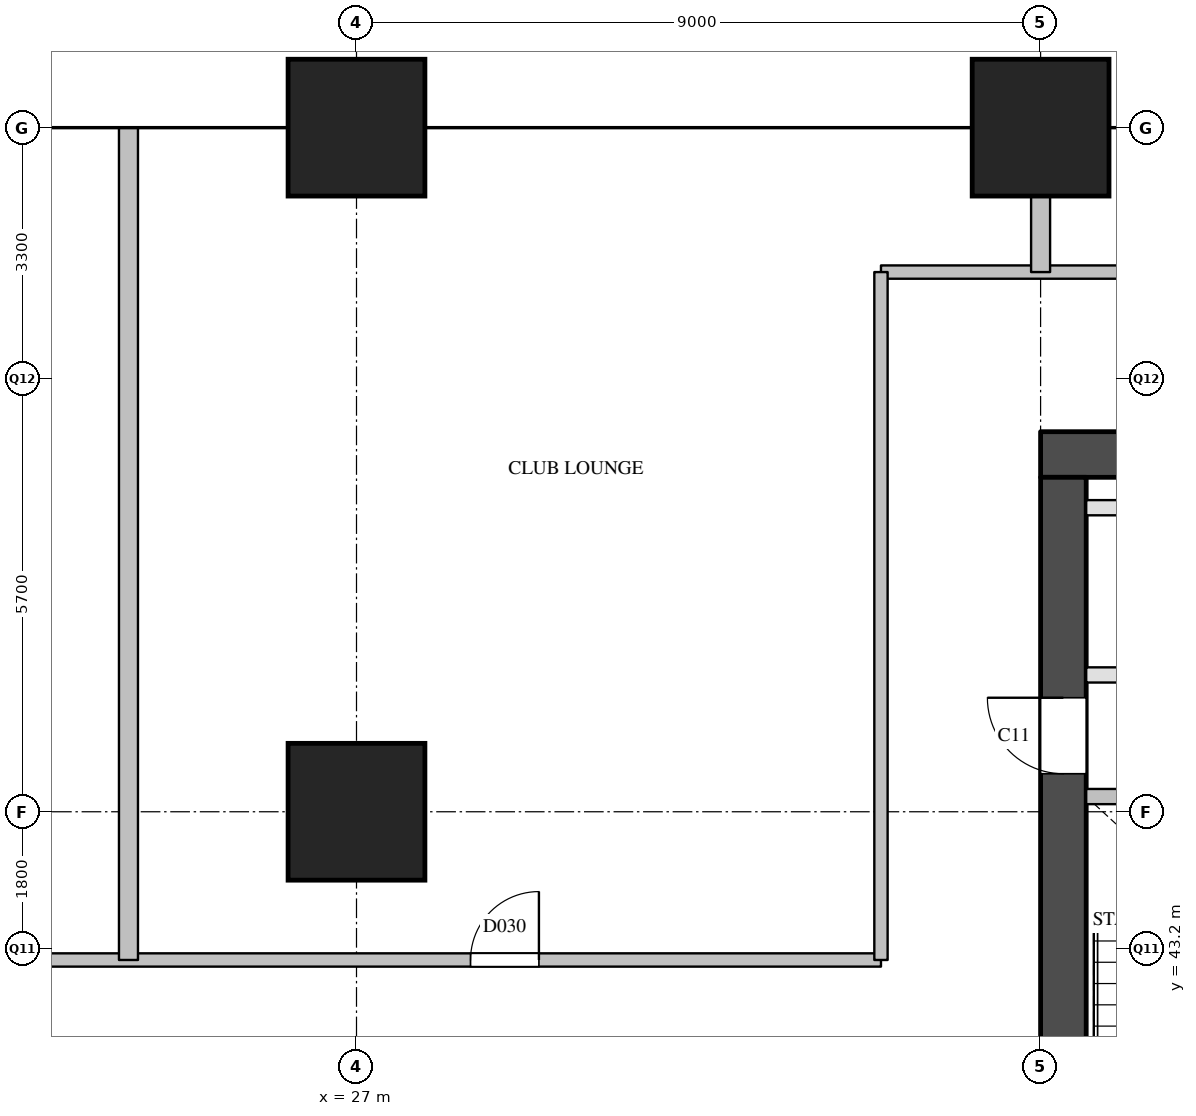
"""IFC4 building model, lengths in metres.
Left out: names, types, materials, properties, quantities, classifications, styles, units other than length and angle.
Written with IfcOpenShell. Run it as: python <this file> out.ifc"""

import sys

from ifc_helpers import new_model, si_unit, direction, frame, frame_2d, origin, origin_2d, place, context, subcontext, project, spatial, rectangle, extrude, element, fill, save


model = new_model("IFC4")
c1 = context("Model", 3, precision=1e-05, world=origin(), true_north=direction((0.0, 1.0)))
c2 = subcontext(c1, "Body", "Model", "MODEL_VIEW")
j1 = project(units=[si_unit("LENGTHUNIT", "METRE"), si_unit("PLANEANGLEUNIT", "RADIAN")], contexts=[c1])
p1 = place(None, origin())
s1 = spatial("IfcSite", under=j1, at=p1, CompositionType="ELEMENT")
p2 = place(p1, origin())
s2 = spatial("IfcBuilding", under=s1, at=p2, CompositionType="ELEMENT")
p3 = place(p2, frame((0.0, 0.0, 46.2)))
s3 = spatial("IfcBuildingStorey", under=s2, at=p3, CompositionType="ELEMENT", Elevation=46.2)
for number, where, z_axis, x_axis in (
    (1, (27.0, 45.0, 0.0), (0.0, 0.0, 1.0), (1.0, 0.0, 0.0)),
    (2, (27.0, 54.0, 0.0), (0.0, 0.0, 1.0), (1.0, 0.0, 0.0)),
    (3, (36.0, 54.0, 0.0), (0.0, 0.0, 1.0), (1.0, 0.0, 0.0)),
):
    element("IfcColumn", number, at=place(p3, frame(where, z_axis=z_axis, x_axis=x_axis)), inside=s3, PredefinedType="COLUMN", context=c2, shape_type="SweptSolid", body=[
        extrude(rectangle(XDim=1.8, YDim=1.8, at=origin_2d()), origin(), (0.0, 0.0, 1.0), 3.8),
    ])
p4 = place(p3, frame((36.0, 49.7, 0.0), z_axis=(0.0, 0.0, 1.0), x_axis=(1.0, 0.0, 0.0)))
e4 = element("IfcWall", 4, at=p4, inside=s3, PredefinedType="SHEAR", context=c2, shape_type="SweptSolid", body=[
    extrude(rectangle(XDim=12.4, YDim=0.6, at=frame_2d((6.2, 0.0))), origin(), (0.0, 0.0, 1.0), 3.5),
])
p5 = place(p3, frame((36.3, 29.1, 0.0), z_axis=(0.0, 0.0, 1.0), x_axis=(0.0, 1.0, 0.0)))
e5 = element("IfcWall", 5, at=p5, inside=s3, PredefinedType="SHEAR", context=c2, shape_type="SweptSolid", body=[
    extrude(rectangle(XDim=20.3, YDim=0.6, at=frame_2d((10.15, 0.0))), origin(), (0.0, 0.0, 1.0), 3.5),
])
p6 = place(p5, frame((3.6, 0.0, 0.0)))
e6 = element("IfcOpeningElement", 6, at=p6, cuts=e5, PredefinedType="OPENING", context=c2, shape_type="SweptSolid", body=[
    extrude(rectangle(XDim=1.8, YDim=2.1, at=frame_2d((0.9, 1.05))), frame((0.0, 0.31, 0.0), z_axis=(0.0, -1.0, 0.0), x_axis=(1.0, 0.0, 0.0)), (0.0, 0.0, 1.0), 0.62),
])
p7 = place(p5, frame((16.4, 0.0, 0.0)))
e7 = element("IfcOpeningElement", 7, at=p7, cuts=e5, PredefinedType="OPENING", context=c2, shape_type="SweptSolid", body=[
    extrude(rectangle(XDim=1.0, YDim=2.1, at=frame_2d((0.5, 1.05))), frame((0.0, 0.31, 0.0), z_axis=(0.0, -1.0, 0.0), x_axis=(1.0, 0.0, 0.0)), (0.0, 0.0, 1.0), 0.62),
])
p8 = place(p3, frame((36.6, 45.2, 0.0), z_axis=(0.0, 0.0, 1.0), x_axis=(1.0, 0.0, 0.0)))
e8 = element("IfcWall", 8, at=p8, inside=s3, PredefinedType="SOLIDWALL", context=c2, shape_type="SweptSolid", body=[
    extrude(rectangle(XDim=10.05, YDim=0.2, at=frame_2d((5.025, 0.0))), origin(), (0.0, 0.0, 1.0), 3.5),
])
p9 = place(p8, frame((1.125, 0.0, 0.0)))
e9 = element("IfcOpeningElement", 9, at=p9, cuts=e8, PredefinedType="OPENING", context=c2, shape_type="SweptSolid", body=[
    extrude(rectangle(XDim=1.1, YDim=2.1, at=frame_2d((0.55, 1.05))), frame((0.0, 0.11, 0.0), z_axis=(0.0, -1.0, 0.0), x_axis=(1.0, 0.0, 0.0)), (0.0, 0.0, 1.0), 0.22),
])
p10 = place(p8, frame((4.475, 0.0, 0.0)))
e10 = element("IfcOpeningElement", 10, at=p10, cuts=e8, PredefinedType="OPENING", context=c2, shape_type="SweptSolid", body=[
    extrude(rectangle(XDim=1.1, YDim=2.1, at=frame_2d((0.55, 1.05))), frame((0.0, 0.11, 0.0), z_axis=(0.0, -1.0, 0.0), x_axis=(1.0, 0.0, 0.0)), (0.0, 0.0, 1.0), 0.22),
])
p11 = place(p8, frame((7.825, 0.0, 0.0)))
e11 = element("IfcOpeningElement", 11, at=p11, cuts=e8, PredefinedType="OPENING", context=c2, shape_type="SweptSolid", body=[
    extrude(rectangle(XDim=1.1, YDim=2.1, at=frame_2d((0.55, 1.05))), frame((0.0, 0.11, 0.0), z_axis=(0.0, -1.0, 0.0), x_axis=(1.0, 0.0, 0.0)), (0.0, 0.0, 1.0), 0.22),
])
p12 = place(p3, frame((36.6, 46.8, 0.0), z_axis=(0.0, 0.0, 1.0), x_axis=(1.0, 0.0, 0.0)))
e12 = element("IfcWall", 12, at=p12, inside=s3, PredefinedType="PARTITIONING", context=c2, shape_type="SweptSolid", body=[
    extrude(rectangle(XDim=11.2, YDim=0.2, at=frame_2d((5.6, 0.0))), origin(), (0.0, 0.0, 1.0), 3.5),
])
p13 = place(p12, frame((2.35, 0.0, 0.0)))
e13 = element("IfcOpeningElement", 13, at=p13, cuts=e12, PredefinedType="OPENING", context=c2, shape_type="SweptSolid", body=[
    extrude(rectangle(XDim=0.9, YDim=2.1, at=frame_2d((0.45, 1.05))), frame((0.0, 0.11, 0.0), z_axis=(0.0, -1.0, 0.0), x_axis=(1.0, 0.0, 0.0)), (0.0, 0.0, 1.0), 0.22),
])
p14 = place(p12, frame((7.95, 0.0, 0.0)))
e14 = element("IfcOpeningElement", 14, at=p14, cuts=e12, PredefinedType="OPENING", context=c2, shape_type="SweptSolid", body=[
    extrude(rectangle(XDim=0.9, YDim=2.1, at=frame_2d((0.45, 1.05))), frame((0.0, 0.11, 0.0), z_axis=(0.0, -1.0, 0.0), x_axis=(1.0, 0.0, 0.0)), (0.0, 0.0, 1.0), 0.22),
])
p15 = place(p3, frame((36.6, 49.0, 0.0), z_axis=(0.0, 0.0, 1.0), x_axis=(1.0, 0.0, 0.0)))
e15 = element("IfcWall", 15, at=p15, inside=s3, PredefinedType="PARTITIONING", context=c2, shape_type="SweptSolid", body=[
    extrude(rectangle(XDim=11.2, YDim=0.2, at=frame_2d((5.6, 0.0))), origin(), (0.0, 0.0, 1.0), 3.5),
])
p16 = place(p3, frame((20.1, 43.05, 0.0), z_axis=(0.0, 0.0, 1.0), x_axis=(1.0, 0.0, 0.0)))
e16 = element("IfcWall", 16, at=p16, inside=s3, PredefinedType="PARTITIONING", context=c2, shape_type="SweptSolid", body=[
    extrude(rectangle(XDim=13.8, YDim=0.175, at=frame_2d((6.9, 0.0))), origin(), (0.0, 0.0, 1.0), 2.5),
])
p17 = place(p16, frame((8.4, 0.0, 0.0)))
e17 = element("IfcOpeningElement", 17, at=p17, cuts=e16, PredefinedType="OPENING", context=c2, shape_type="SweptSolid", body=[
    extrude(rectangle(XDim=0.9, YDim=2.1, at=frame_2d((0.45, 1.05))), frame((0.0, 0.097, 0.0), z_axis=(0.0, -1.0, 0.0), x_axis=(1.0, 0.0, 0.0)), (0.0, 0.0, 1.0), 0.195),
])
p18 = place(p3, frame((33.9, 52.1, 0.0), z_axis=(0.0, 0.0, 1.0), x_axis=(1.0, 0.0, 0.0)))
e18 = element("IfcWall", 18, at=p18, inside=s3, PredefinedType="PARTITIONING", context=c2, shape_type="SweptSolid", body=[
    extrude(rectangle(XDim=16.6, YDim=0.175, at=frame_2d((8.3, 0.0))), origin(), (0.0, 0.0, 1.0), 3.5),
])
p19 = place(p18, frame((4.6, 0.0, 0.0)))
e19 = element("IfcOpeningElement", 19, at=p19, cuts=e18, PredefinedType="OPENING", context=c2, shape_type="SweptSolid", body=[
    extrude(rectangle(XDim=1.0, YDim=2.1, at=frame_2d((0.5, 1.05))), frame((0.0, 0.097, 0.0), z_axis=(0.0, -1.0, 0.0), x_axis=(1.0, 0.0, 0.0)), (0.0, 0.0, 1.0), 0.195),
])
p20 = place(p18, frame((13.232, 0.0, 0.0)))
e20 = element("IfcOpeningElement", 20, at=p20, cuts=e18, PredefinedType="OPENING", context=c2, shape_type="SweptSolid", body=[
    extrude(rectangle(XDim=0.9, YDim=2.1, at=frame_2d((0.45, 1.05))), frame((0.0, 0.097, 0.0), z_axis=(0.0, -1.0, 0.0), x_axis=(1.0, 0.0, 0.0)), (0.0, 0.0, 1.0), 0.195),
])
p21 = place(p3, frame((33.9, 43.05, 0.0), z_axis=(0.0, 0.0, 1.0), x_axis=(0.0, 1.0, 0.0)))
e21 = element("IfcWall", 21, at=p21, inside=s3, PredefinedType="PARTITIONING", context=c2, shape_type="SweptSolid", body=[
    extrude(rectangle(XDim=9.05, YDim=0.175, at=frame_2d((4.525, 0.0))), origin(), (0.0, 0.0, 1.0), 3.5),
])
p22 = place(p3, frame((24.0, 43.05, 0.0), z_axis=(0.0, 0.0, 1.0), x_axis=(0.0, 1.0, 0.0)))
e22 = element("IfcWall", 22, at=p22, inside=s3, PredefinedType="PARTITIONING", context=c2, shape_type="SweptSolid", body=[
    extrude(rectangle(XDim=10.95, YDim=0.25, at=frame_2d((5.475, 0.0))), origin(), (0.0, 0.0, 1.0), 2.5),
])
p23 = place(p3, frame((36.0, 52.1, 0.0), z_axis=(0.0, 0.0, 1.0), x_axis=(0.0, 1.0, 0.0)))
e23 = element("IfcWall", 23, at=p23, inside=s3, PredefinedType="PARTITIONING", context=c2, shape_type="SweptSolid", body=[
    extrude(rectangle(XDim=1.9, YDim=0.25, at=frame_2d((0.95, 0.0))), origin(), (0.0, 0.0, 1.0), 3.5),
])
p24 = place(p7, origin())
e24 = element("IfcDoor", 24, at=p24, inside=s3, OperationType="SINGLE_SWING_RIGHT", PredefinedType="DOOR", context=c2, shape_type="SweptSolid", body=[
    extrude(rectangle(XDim=1.0, YDim=2.1, at=frame_2d((0.5, 1.05))), frame((0.0, 0.025, 0.0), z_axis=(0.0, -1.0, 0.0), x_axis=(1.0, 0.0, 0.0)), (0.0, 0.0, 1.0), 0.05),
])
fill(e7, e24)
p25 = place(p17, origin())
e25 = element("IfcDoor", 25, at=p25, inside=s3, OperationType="SINGLE_SWING_RIGHT", PredefinedType="DOOR", context=c2, shape_type="SweptSolid", body=[
    extrude(rectangle(XDim=0.9, YDim=2.1, at=frame_2d((0.45, 1.05))), frame((0.0, 0.025, 0.0), z_axis=(0.0, -1.0, 0.0), x_axis=(1.0, 0.0, 0.0)), (0.0, 0.0, 1.0), 0.05),
])
fill(e17, e25)
save(model, sys.argv[1])
